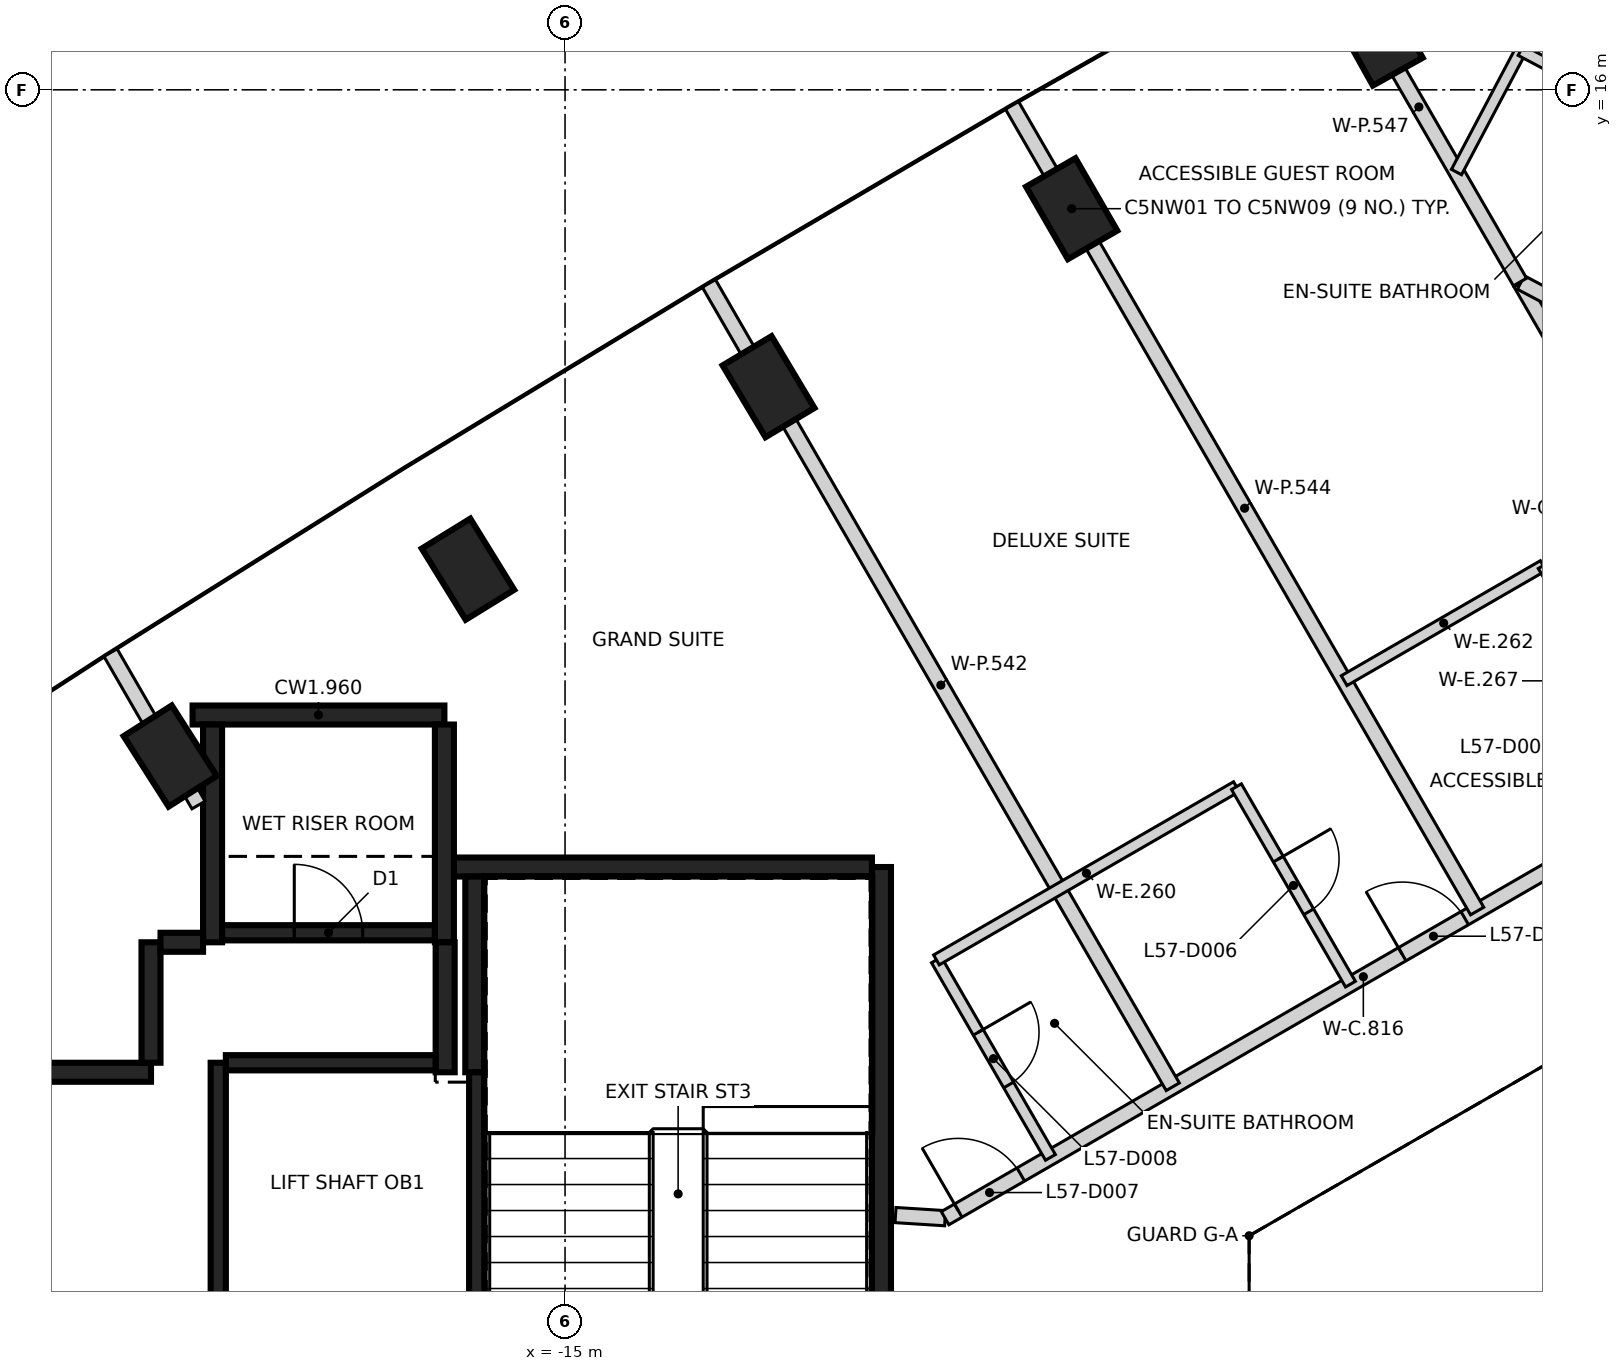
"""IFC4 building model, lengths in metres.
Left out: names, types, materials, properties, quantities, classifications, styles, units other than length and angle.
Written with IfcOpenShell. Run it as: python <this file> out.ifc"""

import sys

from ifc_helpers import new_model, si_unit, direction, frame, frame_2d, origin, origin_2d, place, context, subcontext, project, spatial, rectangle, extrude, element, fill, save


model = new_model("IFC4")
c1 = context("Model", 3, precision=1e-05, world=origin(), true_north=direction((0.0, 1.0)))
c2 = subcontext(c1, "Body", "Model", "MODEL_VIEW")
j1 = project(units=[si_unit("LENGTHUNIT", "METRE"), si_unit("PLANEANGLEUNIT", "RADIAN")], contexts=[c1])
p1 = place(None, origin())
s1 = spatial("IfcSite", under=j1, at=p1, CompositionType="ELEMENT")
p2 = place(p1, origin())
s2 = spatial("IfcBuilding", under=s1, at=p2, CompositionType="ELEMENT")
p3 = place(p2, frame((0.0, 0.0, 228.6)))
s3 = spatial("IfcBuildingStorey", under=s2, at=p3, CompositionType="ELEMENT", Elevation=228.6)
for number, where, z_axis, x_axis in (
    (1, (-4.312, 16.719, -0.35), (0.0, 0.0, 1.0), (-0.487, 0.873, 0.0)),
    (2, (-8.335, 14.436, -0.35), (0.0, 0.0, 1.0), (-0.5, 0.866, 0.0)),
    (3, (-12.323, 12.094, -0.35), (0.0, 0.0, 1.0), (-0.513, 0.858, 0.0)),
    (4, (-16.277, 9.693, -0.35), (0.0, 0.0, 1.0), (-0.525, 0.851, 0.0)),
    (5, (-20.195, 7.235, -0.35), (0.0, 0.0, 1.0), (-0.538, 0.843, 0.0)),
):
    element("IfcColumn", number, at=place(p3, frame(where, z_axis=z_axis, x_axis=x_axis)), inside=s3, PredefinedType="COLUMN", context=c2, shape_type="SweptSolid", body=[
        extrude(rectangle(XDim=1.1, YDim=0.75, at=origin_2d()), origin(), (0.0, 0.0, 1.0), 3.6),
    ])
p4 = place(p3, frame((-10.837, 5.775, 0.0), z_axis=(0.0, 0.0, 1.0), x_axis=(0.0, -1.0, 0.0)))
e6 = element("IfcWall", 6, at=p4, inside=s3, PredefinedType="SHEAR", context=c2, shape_type="SweptSolid", body=[
    extrude(rectangle(XDim=11.55, YDim=0.25, at=frame_2d((5.775, 0.0))), origin(), (0.0, 0.0, 1.0), 3.25),
])
p5 = place(p4, frame((10.025, 0.0, 0.0)))
e7 = element("IfcOpeningElement", 7, at=p5, cuts=e6, PredefinedType="OPENING", context=c2, shape_type="SweptSolid", body=[
    extrude(rectangle(XDim=1.2, YDim=2.1, at=frame_2d((0.6, 1.05))), frame((0.0, 0.135, 0.0), z_axis=(0.0, -1.0, 0.0), x_axis=(1.0, 0.0, 0.0)), (0.0, 0.0, 1.0), 0.27),
])
p6 = place(p4, frame((8.725, 0.0, 0.0)))
e8 = element("IfcOpeningElement", 8, at=p6, cuts=e6, PredefinedType="OPENING", context=c2, shape_type="SweptSolid", body=[
    extrude(rectangle(XDim=1.2, YDim=2.1, at=frame_2d((0.6, 1.05))), frame((0.0, 0.135, 0.0), z_axis=(0.0, -1.0, 0.0), x_axis=(1.0, 0.0, 0.0)), (0.0, 0.0, 1.0), 0.27),
])
p7 = place(p3, frame((-16.472, 5.775, 0.0), z_axis=(0.0, 0.0, 1.0), x_axis=(1.0, 0.0, 0.0)))
e9 = element("IfcWall", 9, at=p7, inside=s3, PredefinedType="SHEAR", context=c2, shape_type="SweptSolid", body=[
    extrude(rectangle(XDim=5.51, YDim=0.25, at=frame_2d((2.755, 0.0))), origin(), (0.0, 0.0, 1.0), 3.25),
])
p8 = place(p3, frame((-19.9, 7.775, 0.0), z_axis=(0.0, 0.0, 1.0), x_axis=(1.0, 0.0, 0.0)))
e10 = element("IfcWall", 10, at=p8, inside=s3, PredefinedType="SHEAR", context=c2, shape_type="SweptSolid", body=[
    extrude(rectangle(XDim=3.313, YDim=0.25, at=frame_2d((1.656, 0.0))), origin(), (0.0, 0.0, 1.0), 3.25),
])
for number, where, z_axis, x_axis in (
    (11, (-16.587, 7.65, 0.0), (0.0, 0.0, 1.0), (0.0, -1.0, 0.0)),
    (12, (-19.637, 4.785, 0.0), (0.0, 0.0, 1.0), (0.0, 1.0, 0.0)),
):
    element("IfcWall", number, at=place(p3, frame(where, z_axis=z_axis, x_axis=x_axis)), inside=s3, PredefinedType="SHEAR", context=c2, shape_type="SweptSolid", body=[
        extrude(rectangle(XDim=2.865, YDim=0.25, at=frame_2d((1.432, 0.0))), origin(), (0.0, 0.0, 1.0), 3.25),
    ])
p9 = place(p3, frame((-16.187, 3.075, 0.0), z_axis=(0.0, 0.0, 1.0), x_axis=(0.0, 1.0, 0.0)))
e13 = element("IfcWall", 13, at=p9, inside=s3, PredefinedType="SHEAR", context=c2, shape_type="SweptSolid", body=[
    extrude(rectangle(XDim=2.575, YDim=0.25, at=frame_2d((1.287, 0.0))), origin(), (0.0, 0.0, 1.0), 3.25),
])
p10 = place(p3, frame((-22.312, 3.075, 0.0), z_axis=(0.0, 0.0, 1.0), x_axis=(1.0, 0.0, 0.0)))
e14 = element("IfcWall", 14, at=p10, inside=s3, PredefinedType="SHEAR", context=c2, shape_type="SweptSolid", body=[
    extrude(rectangle(XDim=1.865, YDim=0.25, at=frame_2d((0.932, 0.0))), origin(), (0.0, 0.0, 1.0), 3.25),
])
p11 = place(p3, frame((-16.577, 4.785, 0.0), z_axis=(0.0, 0.0, 1.0), x_axis=(0.0, -1.0, 0.0)))
e15 = element("IfcWall", 15, at=p11, inside=s3, PredefinedType="SHEAR", context=c2, shape_type="SweptSolid", body=[
    extrude(rectangle(XDim=1.71, YDim=0.25, at=frame_2d((0.855, 0.0))), origin(), (0.0, 0.0, 1.0), 3.25),
])
p12 = place(p3, frame((-20.447, 3.2, 0.0), z_axis=(0.0, 0.0, 1.0), x_axis=(0.0, 1.0, 0.0)))
e16 = element("IfcWall", 16, at=p12, inside=s3, PredefinedType="SHEAR", context=c2, shape_type="SweptSolid", body=[
    extrude(rectangle(XDim=1.584, YDim=0.25, at=frame_2d((0.792, 0.0))), origin(), (0.0, 0.0, 1.0), 3.25),
])
p13 = place(p3, frame((-20.322, 4.785, 0.0), z_axis=(0.0, 0.0, 1.0), x_axis=(1.0, 0.0, 0.0)))
e17 = element("IfcWall", 17, at=p13, inside=s3, PredefinedType="SHEAR", context=c2, shape_type="SweptSolid", body=[
    extrude(rectangle(XDim=0.559, YDim=0.25, at=frame_2d((0.28, 0.0))), origin(), (0.0, 0.0, 1.0), 3.25),
])
p14 = place(p3, frame((-16.162, 3.074, 0.0), z_axis=(0.0, 0.0, 1.0), x_axis=(0.0, -1.0, 0.0)))
e18 = element("IfcWall", 18, at=p14, inside=s3, PredefinedType="SHEAR", context=c2, shape_type="SweptSolid", body=[
    extrude(rectangle(XDim=5.974, YDim=0.2, at=frame_2d((2.987, 0.0))), origin(), (0.0, 0.0, 1.0), 3.25),
])
p15 = place(p3, frame((-19.562, -2.9, 0.0), z_axis=(0.0, 0.0, 1.0), x_axis=(0.0, 1.0, 0.0)))
e19 = element("IfcWall", 19, at=p15, inside=s3, PredefinedType="SHEAR", context=c2, shape_type="SweptSolid", body=[
    extrude(rectangle(XDim=6.1, YDim=0.2, at=frame_2d((3.05, 0.0))), origin(), (0.0, 0.0, 1.0), 3.25),
])
p16 = place(p3, frame((-19.511, 4.91, 0.0), z_axis=(0.0, 0.0, 1.0), x_axis=(1.0, 0.0, 0.0)))
e20 = element("IfcWall", 20, at=p16, inside=s3, PredefinedType="SHEAR", context=c2, shape_type="SweptSolid", body=[
    extrude(rectangle(XDim=2.798, YDim=0.2, at=frame_2d((1.399, 0.0))), origin(), (0.0, 0.0, 1.0), 3.25),
])
p17 = place(p16, frame((0.949, 0.0, 0.0)))
e21 = element("IfcOpeningElement", 21, at=p17, cuts=e20, PredefinedType="OPENING", context=c2, shape_type="SweptSolid", body=[
    extrude(rectangle(XDim=0.9, YDim=2.1, at=frame_2d((0.45, 1.05))), frame((0.0, 0.11, 0.0), z_axis=(0.0, -1.0, 0.0), x_axis=(1.0, 0.0, 0.0)), (0.0, 0.0, 1.0), 0.22),
])
p18 = place(p3, frame((-19.462, 3.2, 0.0), z_axis=(0.0, 0.0, 1.0), x_axis=(1.0, 0.0, 0.0)))
e22 = element("IfcWall", 22, at=p18, inside=s3, PredefinedType="SHEAR", context=c2, shape_type="SweptSolid", body=[
    extrude(rectangle(XDim=2.759, YDim=0.2, at=frame_2d((1.379, 0.0))), origin(), (0.0, 0.0, 1.0), 3.25),
])
p19 = place(p3, frame((-10.652, 1.196, 0.0), z_axis=(0.0, 0.0, 1.0), x_axis=(0.998005794618, -0.063122372489, 0.0)))
e23 = element("IfcWall", 23, at=p19, inside=s3, PredefinedType="PARTITIONING", context=c2, shape_type="SweptSolid", body=[
    extrude(rectangle(XDim=0.654, YDim=0.2, at=frame_2d((0.327, 0.0))), origin(), (0.0, 0.0, 1.0), 3.25),
])
p20 = place(p3, frame((-10.0, 1.155, 0.0), z_axis=(0.0, 0.0, 1.0), x_axis=(0.866014095592, 0.500019585852, 0.0)))
e24 = element("IfcWall", 24, at=p20, inside=s3, PredefinedType="PARTITIONING", context=c2, shape_type="SweptSolid", body=[
    extrude(rectangle(XDim=12.708, YDim=0.2, at=frame_2d((6.354, 0.0))), origin(), (0.0, 0.0, 1.0), 3.25),
])
p21 = place(p20, frame((6.944, 0.0, 0.0)))
e25 = element("IfcOpeningElement", 25, at=p21, cuts=e24, PredefinedType="OPENING", context=c2, shape_type="SweptSolid", body=[
    extrude(rectangle(XDim=0.95, YDim=2.1, at=frame_2d((0.475, 1.05))), frame((0.0, 0.11, 0.0), z_axis=(0.0, -1.0, 0.0), x_axis=(1.0, 0.0, 0.0)), (0.0, 0.0, 1.0), 0.22),
])
p22 = place(p20, frame((0.2, 0.0, 0.0)))
e26 = element("IfcOpeningElement", 26, at=p22, cuts=e24, PredefinedType="OPENING", context=c2, shape_type="SweptSolid", body=[
    extrude(rectangle(XDim=0.95, YDim=2.1, at=frame_2d((0.475, 1.05))), frame((0.0, 0.11, 0.0), z_axis=(0.0, -1.0, 0.0), x_axis=(1.0, 0.0, 0.0)), (0.0, 0.0, 1.0), 0.22),
])
p23 = place(p3, frame((-2.43, 13.459, 0.0), z_axis=(0.0, 0.0, 1.0), x_axis=(0.499957265187, -0.866050075334, 0.0)))
e27 = element("IfcWall", 27, at=p23, inside=s3, PredefinedType="PARTITIONING", context=c2, shape_type="SweptSolid", body=[
    extrude(rectangle(XDim=6.87, YDim=0.2, at=frame_2d((3.435, 0.0))), origin(), (0.0, 0.0, 1.0), 3.25),
])
p24 = place(p23, frame((3.275, 0.0, 0.0)))
e28 = element("IfcOpeningElement", 28, at=p24, cuts=e27, PredefinedType="OPENING", context=c2, shape_type="SweptSolid", body=[
    extrude(rectangle(XDim=1.0, YDim=2.1, at=frame_2d((0.5, 1.05))), frame((0.0, 0.11, 0.0), z_axis=(0.0, -1.0, 0.0), x_axis=(1.0, 0.0, 0.0)), (0.0, 0.0, 1.0), 0.22),
])
p25 = place(p3, frame((-2.425, 13.465, 0.0), z_axis=(0.0, 0.0, 1.0), x_axis=(0.883874806572, -0.467723557572, 0.0)))
e29 = element("IfcWall", 29, at=p25, inside=s3, PredefinedType="PARTITIONING", context=c2, shape_type="SweptSolid", body=[
    extrude(rectangle(XDim=1.572, YDim=0.2, at=frame_2d((0.786, 0.0))), origin(), (0.0, 0.0, 1.0), 3.25),
])
p26 = place(p3, frame((-20.979, 8.595, 0.0), z_axis=(0.0, 0.0, 1.0), x_axis=(0.499950711303, -0.866053858757, 0.0)))
e30 = element("IfcWall", 30, at=p26, inside=s3, PredefinedType="PARTITIONING", context=c2, shape_type="SweptSolid", body=[
    extrude(rectangle(XDim=2.315, YDim=0.2, at=frame_2d((1.157, 0.0))), origin(), (0.0, 0.0, 1.0), 3.25),
])
p27 = place(p3, frame((-13.107, 13.453, 0.0), z_axis=(0.0, 0.0, 1.0), x_axis=(0.500037611077, -0.86600368793, 0.0)))
e31 = element("IfcWall", 31, at=p27, inside=s3, PredefinedType="PARTITIONING", context=c2, shape_type="SweptSolid", body=[
    extrude(rectangle(XDim=12.204, YDim=0.2, at=frame_2d((6.102, 0.0))), origin(), (0.0, 0.0, 1.0), 3.25),
])
p28 = place(p3, frame((-9.119, 15.795, 0.0), z_axis=(0.0, 0.0, 1.0), x_axis=(0.50001601051, -0.866016159915, 0.0)))
e32 = element("IfcWall", 32, at=p28, inside=s3, PredefinedType="PARTITIONING", context=c2, shape_type="SweptSolid", body=[
    extrude(rectangle(XDim=12.238, YDim=0.2, at=frame_2d((6.119, 0.0))), origin(), (0.0, 0.0, 1.0), 3.25),
])
p29 = place(p3, frame((-5.097, 18.078, 0.0), z_axis=(0.0, 0.0, 1.0), x_axis=(0.50004820116, -0.865997573043, 0.0)))
e33 = element("IfcWall", 33, at=p29, inside=s3, PredefinedType="PARTITIONING", context=c2, shape_type="SweptSolid", body=[
    extrude(rectangle(XDim=5.32, YDim=0.2, at=frame_2d((2.66, 0.0))), origin(), (0.0, 0.0, 1.0), 3.25),
])
p30 = place(p3, frame((-10.114, 4.553, 0.0), z_axis=(0.0, 0.0, 1.0), x_axis=(0.50002537861, -0.866010750942, 0.0)))
e34 = element("IfcWall", 34, at=p30, inside=s3, PredefinedType="PARTITIONING", context=c2, shape_type="SweptSolid", body=[
    extrude(rectangle(XDim=3.0, YDim=0.15, at=frame_2d((1.5, 0.0))), origin(), (0.0, 0.0, 1.0), 3.25),
])
p31 = place(p30, frame((1.1, 0.0, 0.0)))
e35 = element("IfcOpeningElement", 35, at=p31, cuts=e34, PredefinedType="OPENING", context=c2, shape_type="SweptSolid", body=[
    extrude(rectangle(XDim=0.8, YDim=2.1, at=frame_2d((0.4, 1.05))), frame((0.0, 0.085, 0.0), z_axis=(0.0, -1.0, 0.0), x_axis=(1.0, 0.0, 0.0)), (0.0, 0.0, 1.0), 0.17),
])
p32 = place(p3, frame((-10.114, 4.553, 0.0), z_axis=(0.0, 0.0, 1.0), x_axis=(0.866002713795, 0.500039298155, 0.0)))
e36 = element("IfcWall", 36, at=p32, inside=s3, PredefinedType="PARTITIONING", context=c2, shape_type="SweptSolid", body=[
    extrude(rectangle(XDim=4.558, YDim=0.15, at=frame_2d((2.279, 0.0))), origin(), (0.0, 0.0, 1.0), 3.25),
])
p33 = place(p3, frame((-6.167, 6.832, 0.0), z_axis=(0.0, 0.0, 1.0), x_axis=(0.499990139034, -0.866031096941, 0.0)))
e37 = element("IfcWall", 37, at=p33, inside=s3, PredefinedType="PARTITIONING", context=c2, shape_type="SweptSolid", body=[
    extrude(rectangle(XDim=3.0, YDim=0.15, at=frame_2d((1.5, 0.0))), origin(), (0.0, 0.0, 1.0), 3.25),
])
p34 = place(p33, frame((1.1, 0.0, 0.0)))
e38 = element("IfcOpeningElement", 38, at=p34, cuts=e37, PredefinedType="OPENING", context=c2, shape_type="SweptSolid", body=[
    extrude(rectangle(XDim=0.8, YDim=2.1, at=frame_2d((0.4, 1.05))), frame((0.0, 0.085, 0.0), z_axis=(0.0, -1.0, 0.0), x_axis=(1.0, 0.0, 0.0)), (0.0, 0.0, 1.0), 0.17),
])
p35 = place(p3, frame((-4.75, 8.227, 0.0), z_axis=(0.0, 0.0, 1.0), x_axis=(0.865893821749, 0.500227837548, 0.0)))
e39 = element("IfcWall", 39, at=p35, inside=s3, PredefinedType="PARTITIONING", context=c2, shape_type="SweptSolid", body=[
    extrude(rectangle(XDim=3.024, YDim=0.15, at=frame_2d((1.512, 0.0))), origin(), (0.0, 0.0, 1.0), 3.25),
])
p36 = place(p3, frame((-3.272, 14.918, 0.0), z_axis=(0.0, 0.0, 1.0), x_axis=(0.467162796658, 0.884171319043, 0.0)))
e40 = element("IfcWall", 40, at=p36, inside=s3, PredefinedType="PARTITIONING", context=c2, shape_type="SweptSolid", body=[
    extrude(rectangle(XDim=1.811, YDim=0.15, at=frame_2d((0.905, 0.0))), origin(), (0.0, 0.0, 1.0), 3.25),
])
p37 = place(p3, frame((-2.426, 16.519, 0.0), z_axis=(0.0, 0.0, 1.0), x_axis=(0.884056991815, -0.467379112952, 0.0)))
e41 = element("IfcWall", 41, at=p37, inside=s3, PredefinedType="PARTITIONING", context=c2, shape_type="SweptSolid", body=[
    extrude(rectangle(XDim=3.0, YDim=0.15, at=frame_2d((1.5, 0.0))), origin(), (0.0, 0.0, 1.0), 3.25),
])
p38 = place(p37, frame((1.1, 0.0, 0.0)))
e42 = element("IfcOpeningElement", 42, at=p38, cuts=e41, PredefinedType="OPENING", context=c2, shape_type="SweptSolid", body=[
    extrude(rectangle(XDim=0.8, YDim=2.1, at=frame_2d((0.4, 1.05))), frame((0.0, 0.085, 0.0), z_axis=(0.0, -1.0, 0.0), x_axis=(1.0, 0.0, 0.0)), (0.0, 0.0, 1.0), 0.17),
])
p39 = place(p3, frame((-2.131, 9.74, 0.0), z_axis=(0.0, 0.0, 1.0), x_axis=(0.500010275428, -0.866019471182, 0.0)))
e43 = element("IfcWall", 43, at=p39, inside=s3, PredefinedType="PARTITIONING", context=c2, shape_type="SweptSolid", body=[
    extrude(rectangle(XDim=3.5, YDim=0.15, at=frame_2d((1.75, 0.0))), origin(), (0.0, 0.0, 1.0), 3.25),
])
p40 = place(p39, frame((1.35, 0.0, 0.0)))
e44 = element("IfcOpeningElement", 44, at=p40, cuts=e43, PredefinedType="OPENING", context=c2, shape_type="SweptSolid", body=[
    extrude(rectangle(XDim=0.8, YDim=2.1, at=frame_2d((0.4, 1.05))), frame((0.0, 0.085, 0.0), z_axis=(0.0, -1.0, 0.0), x_axis=(1.0, 0.0, 0.0)), (0.0, 0.0, 1.0), 0.17),
])
p41 = place(p17, origin())
e45 = element("IfcDoor", 45, at=p41, inside=s3, OperationType="SINGLE_SWING_RIGHT", PredefinedType="DOOR", context=c2, shape_type="SweptSolid", body=[
    extrude(rectangle(XDim=0.9, YDim=2.1, at=frame_2d((0.45, 1.05))), frame((0.0, 0.025, 0.0), z_axis=(0.0, -1.0, 0.0), x_axis=(1.0, 0.0, 0.0)), (0.0, 0.0, 1.0), 0.05),
])
fill(e21, e45)
p42 = place(p21, origin())
e46 = element("IfcDoor", 46, at=p42, inside=s3, OperationType="SINGLE_SWING_LEFT", PredefinedType="DOOR", context=c2, shape_type="SweptSolid", body=[
    extrude(rectangle(XDim=0.95, YDim=2.1, at=frame_2d((0.475, 1.05))), frame((0.0, 0.025, 0.0), z_axis=(0.0, -1.0, 0.0), x_axis=(1.0, 0.0, 0.0)), (0.0, 0.0, 1.0), 0.05),
])
fill(e25, e46)
p43 = place(p34, frame((0.8, 0.0, 0.0), z_axis=(0.0, 0.0, 1.0), x_axis=(-1.0, 0.0, 0.0)))
e47 = element("IfcDoor", 47, at=p43, inside=s3, OperationType="SINGLE_SWING_LEFT", PredefinedType="DOOR", context=c2, shape_type="SweptSolid", body=[
    extrude(rectangle(XDim=0.8, YDim=2.1, at=frame_2d((0.4, 1.05))), frame((0.0, 0.025, 0.0), z_axis=(0.0, -1.0, 0.0), x_axis=(1.0, 0.0, 0.0)), (0.0, 0.0, 1.0), 0.05),
])
fill(e38, e47)
p44 = place(p22, origin())
e48 = element("IfcDoor", 48, at=p44, inside=s3, OperationType="SINGLE_SWING_LEFT", PredefinedType="DOOR", context=c2, shape_type="SweptSolid", body=[
    extrude(rectangle(XDim=0.95, YDim=2.1, at=frame_2d((0.475, 1.05))), frame((0.0, 0.025, 0.0), z_axis=(0.0, -1.0, 0.0), x_axis=(1.0, 0.0, 0.0)), (0.0, 0.0, 1.0), 0.05),
])
fill(e26, e48)
p45 = place(p31, frame((0.8, 0.0, 0.0), z_axis=(0.0, 0.0, 1.0), x_axis=(-1.0, 0.0, 0.0)))
e49 = element("IfcDoor", 49, at=p45, inside=s3, OperationType="SINGLE_SWING_LEFT", PredefinedType="DOOR", context=c2, shape_type="SweptSolid", body=[
    extrude(rectangle(XDim=0.8, YDim=2.1, at=frame_2d((0.4, 1.05))), frame((0.0, 0.025, 0.0), z_axis=(0.0, -1.0, 0.0), x_axis=(1.0, 0.0, 0.0)), (0.0, 0.0, 1.0), 0.05),
])
fill(e35, e49)
save(model, sys.argv[1])
